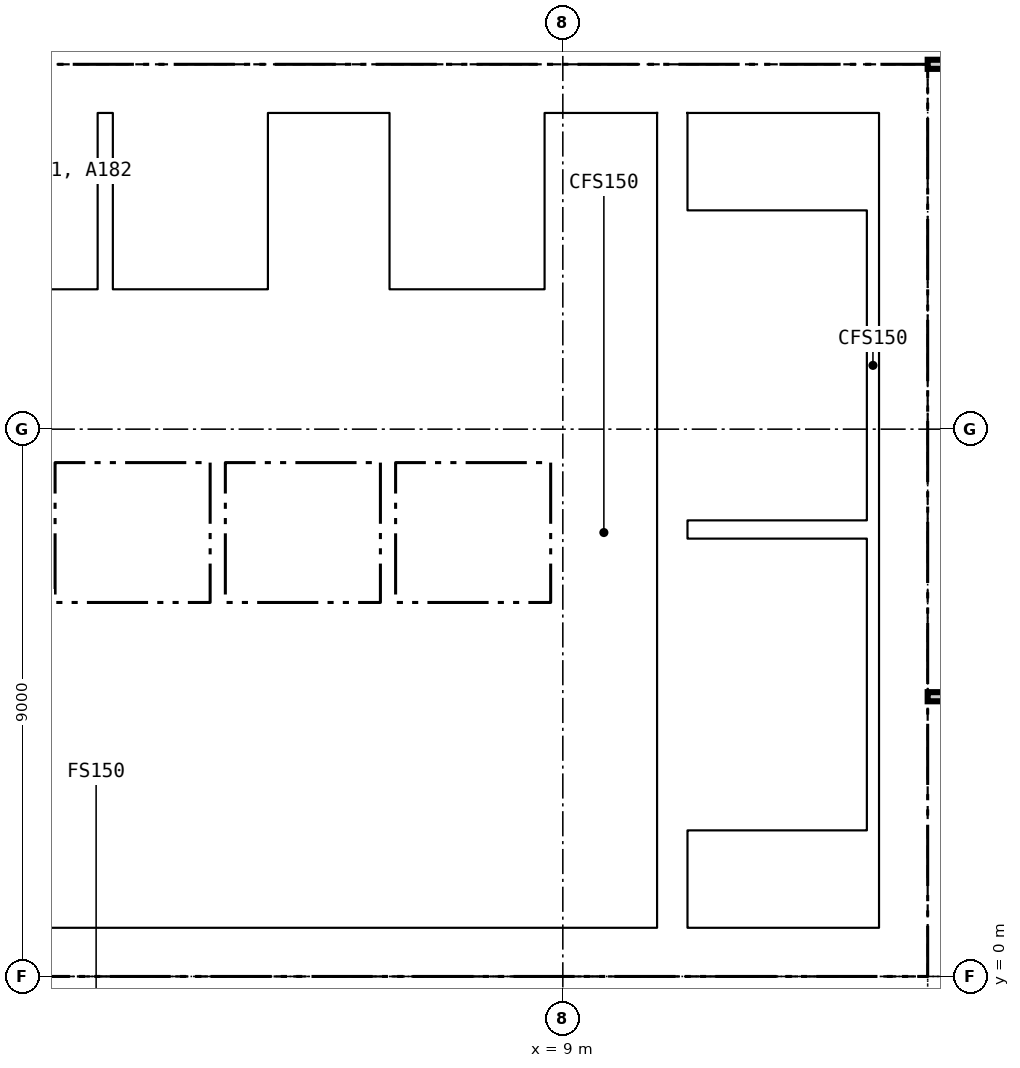
"""IFC4 building model, lengths in metres.
Left out: names, types, materials, properties, quantities, classifications, styles, units other than length and angle.
Written with IfcOpenShell. Run it as: python <this file> out.ifc"""

import sys

from ifc_helpers import new_model, si_unit, direction, frame, frame_2d, origin, place, context, subcontext, project, spatial, rectangle, extrude, element, fill, save


model = new_model("IFC4")
c1 = context("Model", 3, precision=1e-05, world=origin(), true_north=direction((0.0, 1.0)))
c2 = subcontext(c1, "Body", "Model", "MODEL_VIEW")
j1 = project(units=[si_unit("LENGTHUNIT", "METRE"), si_unit("PLANEANGLEUNIT", "RADIAN")], contexts=[c1])
p1 = place(None, origin())
s1 = spatial("IfcSite", under=j1, at=p1, CompositionType="ELEMENT")
p2 = place(p1, origin())
s2 = spatial("IfcBuilding", under=s1, at=p2, CompositionType="ELEMENT")
p3 = place(p2, frame((0.0, 0.0, 137.1)))
s3 = spatial("IfcBuildingStorey", under=s2, at=p3, CompositionType="ELEMENT", Elevation=137.1)
p4 = place(p3, frame((-15.0, 0.4, -0.15), z_axis=(0.0, 0.0, 1.0), x_axis=(1.0, 0.0, 0.0)))
e1 = element("IfcWall", 1, at=p4, inside=s3, PredefinedType="SOLIDWALL", context=c2, shape_type="SweptSolid", body=[
    extrude(rectangle(XDim=30.0, YDim=0.8, at=frame_2d((15.0, 0.0))), origin(), (0.0, 0.0, 1.0), 3.65),
])
p5 = place(p4, frame((5.8, 0.0, 0.15)))
e2 = element("IfcOpeningElement", 2, at=p5, cuts=e1, PredefinedType="OPENING", context=c2, shape_type="SweptSolid", body=[
    extrude(rectangle(XDim=2.4, YDim=2.4, at=frame_2d((1.2, 1.2))), frame((0.0, 0.41, 0.0), z_axis=(0.0, -1.0, 0.0), x_axis=(1.0, 0.0, 0.0)), (0.0, 0.0, 1.0), 0.82),
])
p6 = place(p4, frame((13.8, 0.0, 0.15)))
e3 = element("IfcOpeningElement", 3, at=p6, cuts=e1, PredefinedType="OPENING", context=c2, shape_type="SweptSolid", body=[
    extrude(rectangle(XDim=2.4, YDim=2.4, at=frame_2d((1.2, 1.2))), frame((0.0, 0.41, 0.0), z_axis=(0.0, -1.0, 0.0), x_axis=(1.0, 0.0, 0.0)), (0.0, 0.0, 1.0), 0.82),
])
p7 = place(p4, frame((21.8, 0.0, 0.15)))
e4 = element("IfcOpeningElement", 4, at=p7, cuts=e1, PredefinedType="OPENING", context=c2, shape_type="SweptSolid", body=[
    extrude(rectangle(XDim=2.4, YDim=2.4, at=frame_2d((1.2, 1.2))), frame((0.0, 0.41, 0.0), z_axis=(0.0, -1.0, 0.0), x_axis=(1.0, 0.0, 0.0)), (0.0, 0.0, 1.0), 0.82),
])
p8 = place(p4, frame((1.5, 0.0, 0.15)))
e5 = element("IfcOpeningElement", 5, at=p8, cuts=e1, PredefinedType="OPENING", context=c2, shape_type="SweptSolid", body=[
    extrude(rectangle(XDim=1.2, YDim=2.1, at=frame_2d((0.6, 1.05))), frame((0.0, 0.41, 0.0), z_axis=(0.0, -1.0, 0.0), x_axis=(1.0, 0.0, 0.0)), (0.0, 0.0, 1.0), 0.82),
])
p9 = place(p4, frame((27.3, 0.0, 0.15)))
e6 = element("IfcOpeningElement", 6, at=p9, cuts=e1, PredefinedType="OPENING", context=c2, shape_type="SweptSolid", body=[
    extrude(rectangle(XDim=1.2, YDim=2.1, at=frame_2d((0.6, 1.05))), frame((0.0, 0.41, 0.0), z_axis=(0.0, -1.0, 0.0), x_axis=(1.0, 0.0, 0.0)), (0.0, 0.0, 1.0), 0.82),
])
p10 = place(p3, frame((-15.0, 14.6, -0.15), z_axis=(0.0, 0.0, 1.0), x_axis=(1.0, 0.0, 0.0)))
e7 = element("IfcWall", 7, at=p10, inside=s3, PredefinedType="SOLIDWALL", context=c2, shape_type="SweptSolid", body=[
    extrude(rectangle(XDim=30.0, YDim=0.8, at=frame_2d((15.0, 0.0))), origin(), (0.0, 0.0, 1.0), 3.65),
])
p11 = place(p10, frame((9.25, 0.0, 0.15)))
e8 = element("IfcOpeningElement", 8, at=p11, cuts=e7, PredefinedType="OPENING", context=c2, shape_type="SweptSolid", body=[
    extrude(rectangle(XDim=1.5, YDim=2.1, at=frame_2d((0.75, 1.05))), frame((0.0, 0.41, 0.0), z_axis=(0.0, -1.0, 0.0), x_axis=(1.0, 0.0, 0.0)), (0.0, 0.0, 1.0), 0.82),
])
p12 = place(p10, frame((19.4, 0.0, 0.15)))
e9 = element("IfcOpeningElement", 9, at=p12, cuts=e7, PredefinedType="OPENING", context=c2, shape_type="SweptSolid", body=[
    extrude(rectangle(XDim=1.5, YDim=2.1, at=frame_2d((0.75, 1.05))), frame((0.0, 0.41, 0.0), z_axis=(0.0, -1.0, 0.0), x_axis=(1.0, 0.0, 0.0)), (0.0, 0.0, 1.0), 0.82),
])
p13 = place(p10, frame((1.5, 0.0, 0.15)))
e10 = element("IfcOpeningElement", 10, at=p13, cuts=e7, PredefinedType="OPENING", context=c2, shape_type="SweptSolid", body=[
    extrude(rectangle(XDim=1.2, YDim=2.1, at=frame_2d((0.6, 1.05))), frame((0.0, 0.41, 0.0), z_axis=(0.0, -1.0, 0.0), x_axis=(1.0, 0.0, 0.0)), (0.0, 0.0, 1.0), 0.82),
])
p14 = place(p10, frame((27.3, 0.0, 0.15)))
e11 = element("IfcOpeningElement", 11, at=p14, cuts=e7, PredefinedType="OPENING", context=c2, shape_type="SweptSolid", body=[
    extrude(rectangle(XDim=1.2, YDim=2.1, at=frame_2d((0.6, 1.05))), frame((0.0, 0.41, 0.0), z_axis=(0.0, -1.0, 0.0), x_axis=(1.0, 0.0, 0.0)), (0.0, 0.0, 1.0), 0.82),
])
p15 = place(p3, frame((14.6, 0.8, -0.15), z_axis=(0.0, 0.0, 1.0), x_axis=(0.0, 1.0, 0.0)))
e12 = element("IfcWall", 12, at=p15, inside=s3, PredefinedType="SOLIDWALL", context=c2, shape_type="SweptSolid", body=[
    extrude(rectangle(XDim=13.4, YDim=0.8, at=frame_2d((6.7, 0.0))), origin(), (0.0, 0.0, 1.0), 3.65),
])
p16 = place(p3, frame((10.8, 0.8, -0.15), z_axis=(0.0, 0.0, 1.0), x_axis=(0.0, 1.0, 0.0)))
e13 = element("IfcWall", 13, at=p16, inside=s3, PredefinedType="SOLIDWALL", context=c2, shape_type="SweptSolid", body=[
    extrude(rectangle(XDim=13.4, YDim=0.5, at=frame_2d((6.7, 0.0))), origin(), (0.0, 0.0, 1.0), 3.65),
])
p17 = place(p3, frame((-10.55, 3.5, 0.0), z_axis=(0.0, 0.0, 1.0), x_axis=(1.0, 0.0, 0.0)))
e14 = element("IfcWall", 14, at=p17, inside=s3, PredefinedType="PARTITIONING", context=c2, shape_type="SweptSolid", body=[
    extrude(rectangle(XDim=21.1, YDim=0.2, at=frame_2d((10.55, 0.0))), origin(), (0.0, 0.0, 1.0), 3.5),
])
p18 = place(p17, frame((0.663, 0.0, 0.0)))
e15 = element("IfcOpeningElement", 15, at=p18, cuts=e14, PredefinedType="OPENING", context=c2, shape_type="SweptSolid", body=[
    extrude(rectangle(XDim=1.0, YDim=2.1, at=frame_2d((0.5, 1.05))), frame((0.0, 0.11, 0.0), z_axis=(0.0, -1.0, 0.0), x_axis=(1.0, 0.0, 0.0)), (0.0, 0.0, 1.0), 0.22),
])
p19 = place(p17, frame((4.3, 0.0, 0.0)))
e16 = element("IfcOpeningElement", 16, at=p19, cuts=e14, PredefinedType="OPENING", context=c2, shape_type="SweptSolid", body=[
    extrude(rectangle(XDim=1.0, YDim=2.1, at=frame_2d((0.5, 1.05))), frame((0.0, 0.11, 0.0), z_axis=(0.0, -1.0, 0.0), x_axis=(1.0, 0.0, 0.0)), (0.0, 0.0, 1.0), 0.22),
])
p20 = place(p17, frame((9.1, 0.0, 0.0)))
e17 = element("IfcOpeningElement", 17, at=p20, cuts=e14, PredefinedType="OPENING", context=c2, shape_type="SweptSolid", body=[
    extrude(rectangle(XDim=1.0, YDim=2.1, at=frame_2d((0.5, 1.05))), frame((0.0, 0.11, 0.0), z_axis=(0.0, -1.0, 0.0), x_axis=(1.0, 0.0, 0.0)), (0.0, 0.0, 1.0), 0.22),
])
p21 = place(p17, frame((13.25, 0.0, 0.0)))
e18 = element("IfcOpeningElement", 18, at=p21, cuts=e14, PredefinedType="OPENING", context=c2, shape_type="SweptSolid", body=[
    extrude(rectangle(XDim=1.0, YDim=2.1, at=frame_2d((0.5, 1.05))), frame((0.0, 0.11, 0.0), z_axis=(0.0, -1.0, 0.0), x_axis=(1.0, 0.0, 0.0)), (0.0, 0.0, 1.0), 0.22),
])
p22 = place(p17, frame((16.962, 0.0, 0.0)))
e19 = element("IfcOpeningElement", 19, at=p22, cuts=e14, PredefinedType="OPENING", context=c2, shape_type="SweptSolid", body=[
    extrude(rectangle(XDim=1.0, YDim=2.1, at=frame_2d((0.5, 1.05))), frame((0.0, 0.11, 0.0), z_axis=(0.0, -1.0, 0.0), x_axis=(1.0, 0.0, 0.0)), (0.0, 0.0, 1.0), 0.22),
])
p23 = place(p17, frame((19.9, 0.0, 0.0)))
e20 = element("IfcOpeningElement", 20, at=p23, cuts=e14, PredefinedType="OPENING", context=c2, shape_type="SweptSolid", body=[
    extrude(rectangle(XDim=0.9, YDim=2.1, at=frame_2d((0.45, 1.05))), frame((0.0, 0.11, 0.0), z_axis=(0.0, -1.0, 0.0), x_axis=(1.0, 0.0, 0.0)), (0.0, 0.0, 1.0), 0.22),
])
p24 = place(p3, frame((-10.55, 6.025, 0.0), z_axis=(0.0, 0.0, 1.0), x_axis=(1.0, 0.0, 0.0)))
e21 = element("IfcWall", 21, at=p24, inside=s3, PredefinedType="PARTITIONING", context=c2, shape_type="SweptSolid", body=[
    extrude(rectangle(XDim=21.1, YDim=0.25, at=frame_2d((10.55, 0.0))), origin(), (0.0, 0.0, 1.0), 3.5),
])
p25 = place(p3, frame((-10.55, 8.55, 0.0), z_axis=(0.0, 0.0, 1.0), x_axis=(1.0, 0.0, 0.0)))
e22 = element("IfcWall", 22, at=p25, inside=s3, PredefinedType="PARTITIONING", context=c2, shape_type="SweptSolid", body=[
    extrude(rectangle(XDim=21.1, YDim=0.2, at=frame_2d((10.55, 0.0))), origin(), (0.0, 0.0, 1.0), 3.5),
])
p26 = place(p25, frame((0.675, 0.0, 0.0)))
e23 = element("IfcOpeningElement", 23, at=p26, cuts=e22, PredefinedType="OPENING", context=c2, shape_type="SweptSolid", body=[
    extrude(rectangle(XDim=1.2, YDim=2.1, at=frame_2d((0.6, 1.05))), frame((0.0, 0.11, 0.0), z_axis=(0.0, -1.0, 0.0), x_axis=(1.0, 0.0, 0.0)), (0.0, 0.0, 1.0), 0.22),
])
p27 = place(p25, frame((3.475, 0.0, 0.0)))
e24 = element("IfcOpeningElement", 24, at=p27, cuts=e22, PredefinedType="OPENING", context=c2, shape_type="SweptSolid", body=[
    extrude(rectangle(XDim=1.2, YDim=2.1, at=frame_2d((0.6, 1.05))), frame((0.0, 0.11, 0.0), z_axis=(0.0, -1.0, 0.0), x_axis=(1.0, 0.0, 0.0)), (0.0, 0.0, 1.0), 0.22),
])
p28 = place(p25, frame((6.275, 0.0, 0.0)))
e25 = element("IfcOpeningElement", 25, at=p28, cuts=e22, PredefinedType="OPENING", context=c2, shape_type="SweptSolid", body=[
    extrude(rectangle(XDim=1.2, YDim=2.1, at=frame_2d((0.6, 1.05))), frame((0.0, 0.11, 0.0), z_axis=(0.0, -1.0, 0.0), x_axis=(1.0, 0.0, 0.0)), (0.0, 0.0, 1.0), 0.22),
])
p29 = place(p25, frame((9.075, 0.0, 0.0)))
e26 = element("IfcOpeningElement", 26, at=p29, cuts=e22, PredefinedType="OPENING", context=c2, shape_type="SweptSolid", body=[
    extrude(rectangle(XDim=1.2, YDim=2.1, at=frame_2d((0.6, 1.05))), frame((0.0, 0.11, 0.0), z_axis=(0.0, -1.0, 0.0), x_axis=(1.0, 0.0, 0.0)), (0.0, 0.0, 1.0), 0.22),
])
p30 = place(p25, frame((11.875, 0.0, 0.0)))
e27 = element("IfcOpeningElement", 27, at=p30, cuts=e22, PredefinedType="OPENING", context=c2, shape_type="SweptSolid", body=[
    extrude(rectangle(XDim=1.2, YDim=2.1, at=frame_2d((0.6, 1.05))), frame((0.0, 0.11, 0.0), z_axis=(0.0, -1.0, 0.0), x_axis=(1.0, 0.0, 0.0)), (0.0, 0.0, 1.0), 0.22),
])
p31 = place(p25, frame((14.675, 0.0, 0.0)))
e28 = element("IfcOpeningElement", 28, at=p31, cuts=e22, PredefinedType="OPENING", context=c2, shape_type="SweptSolid", body=[
    extrude(rectangle(XDim=1.2, YDim=2.1, at=frame_2d((0.6, 1.05))), frame((0.0, 0.11, 0.0), z_axis=(0.0, -1.0, 0.0), x_axis=(1.0, 0.0, 0.0)), (0.0, 0.0, 1.0), 0.22),
])
p32 = place(p25, frame((17.475, 0.0, 0.0)))
e29 = element("IfcOpeningElement", 29, at=p32, cuts=e22, PredefinedType="OPENING", context=c2, shape_type="SweptSolid", body=[
    extrude(rectangle(XDim=1.2, YDim=2.1, at=frame_2d((0.6, 1.05))), frame((0.0, 0.11, 0.0), z_axis=(0.0, -1.0, 0.0), x_axis=(1.0, 0.0, 0.0)), (0.0, 0.0, 1.0), 0.22),
])
p33 = place(p25, frame((19.9, 0.0, 0.0)))
e30 = element("IfcOpeningElement", 30, at=p33, cuts=e22, PredefinedType="OPENING", context=c2, shape_type="SweptSolid", body=[
    extrude(rectangle(XDim=0.9, YDim=2.1, at=frame_2d((0.45, 1.05))), frame((0.0, 0.11, 0.0), z_axis=(0.0, -1.0, 0.0), x_axis=(1.0, 0.0, 0.0)), (0.0, 0.0, 1.0), 0.22),
])
p34 = place(p3, frame((-4.25, 11.2, 0.0), z_axis=(0.0, 0.0, 1.0), x_axis=(1.0, 0.0, 0.0)))
e31 = element("IfcWall", 31, at=p34, inside=s3, PredefinedType="PARTITIONING", context=c2, shape_type="SweptSolid", body=[
    extrude(rectangle(XDim=8.65, YDim=0.2, at=frame_2d((4.325, 0.0))), origin(), (0.0, 0.0, 1.0), 3.5),
])
p35 = place(p34, frame((0.825, 0.0, 0.0)))
e32 = element("IfcOpeningElement", 32, at=p35, cuts=e31, PredefinedType="OPENING", context=c2, shape_type="SweptSolid", body=[
    extrude(rectangle(XDim=1.4, YDim=2.1, at=frame_2d((0.7, 1.05))), frame((0.0, 0.11, 0.0), z_axis=(0.0, -1.0, 0.0), x_axis=(1.0, 0.0, 0.0)), (0.0, 0.0, 1.0), 0.22),
])
p36 = place(p34, frame((3.625, 0.0, 0.0)))
e33 = element("IfcOpeningElement", 33, at=p36, cuts=e31, PredefinedType="OPENING", context=c2, shape_type="SweptSolid", body=[
    extrude(rectangle(XDim=1.4, YDim=2.1, at=frame_2d((0.7, 1.05))), frame((0.0, 0.11, 0.0), z_axis=(0.0, -1.0, 0.0), x_axis=(1.0, 0.0, 0.0)), (0.0, 0.0, 1.0), 0.22),
])
p37 = place(p3, frame((5.9, 11.2, 0.0), z_axis=(0.0, 0.0, 1.0), x_axis=(1.0, 0.0, 0.0)))
e34 = element("IfcWall", 34, at=p37, inside=s3, PredefinedType="PARTITIONING", context=c2, shape_type="SweptSolid", body=[
    extrude(rectangle(XDim=4.65, YDim=0.2, at=frame_2d((2.325, 0.0))), origin(), (0.0, 0.0, 1.0), 3.5),
])
p38 = place(p37, frame((3.4, 0.0, 0.0)))
e35 = element("IfcOpeningElement", 35, at=p38, cuts=e34, PredefinedType="OPENING", context=c2, shape_type="SweptSolid", body=[
    extrude(rectangle(XDim=0.9, YDim=2.1, at=frame_2d((0.45, 1.05))), frame((0.0, 0.11, 0.0), z_axis=(0.0, -1.0, 0.0), x_axis=(1.0, 0.0, 0.0)), (0.0, 0.0, 1.0), 0.22),
])
for number, where, z_axis, x_axis in (
    (36, (1.45, 3.6, 0.0), (0.0, 0.0, 1.0), (0.0, 1.0, 0.0)),
    (37, (4.95, 3.6, 0.0), (0.0, 0.0, 1.0), (0.0, 1.0, 0.0)),
):
    element("IfcWall", number, at=place(p3, frame(where, z_axis=z_axis, x_axis=x_axis)), inside=s3, PredefinedType="PARTITIONING", context=c2, shape_type="SweptSolid", body=[
        extrude(rectangle(XDim=2.3, YDim=0.15, at=frame_2d((1.15, 0.0))), origin(), (0.0, 0.0, 1.0), 3.5),
    ])
p39 = place(p3, frame((8.925, 3.6, 0.0), z_axis=(0.0, 0.0, 1.0), x_axis=(0.0, 1.0, 0.0)))
e38 = element("IfcWall", 38, at=p39, inside=s3, PredefinedType="PARTITIONING", context=c2, shape_type="SweptSolid", body=[
    extrude(rectangle(XDim=2.3, YDim=0.25, at=frame_2d((1.15, 0.0))), origin(), (0.0, 0.0, 1.0), 3.5),
])
for number, where, z_axis, x_axis in (
    (39, (0.525, 6.15, 0.0), (0.0, 0.0, 1.0), (0.0, 1.0, 0.0)),
    (40, (3.325, 6.15, 0.0), (0.0, 0.0, 1.0), (0.0, 1.0, 0.0)),
    (41, (6.125, 6.15, 0.0), (0.0, 0.0, 1.0), (0.0, 1.0, 0.0)),
    (42, (8.925, 6.15, 0.0), (0.0, 0.0, 1.0), (0.0, 1.0, 0.0)),
):
    element("IfcWall", number, at=place(p3, frame(where, z_axis=z_axis, x_axis=x_axis)), inside=s3, PredefinedType="PARTITIONING", context=c2, shape_type="SweptSolid", body=[
        extrude(rectangle(XDim=2.3, YDim=0.25, at=frame_2d((1.15, 0.0))), origin(), (0.0, 0.0, 1.0), 3.5),
    ])
for number, where, z_axis, x_axis in (
    (43, (1.475, 11.3, 0.0), (0.0, 0.0, 1.0), (0.0, 1.0, 0.0)),
    (44, (4.275, 11.3, 0.0), (0.0, 0.0, 1.0), (0.0, 1.0, 0.0)),
    (45, (6.025, 11.3, 0.0), (0.0, 0.0, 1.0), (0.0, 1.0, 0.0)),
    (46, (8.825, 11.3, 0.0), (0.0, 0.0, 1.0), (0.0, 1.0, 0.0)),
):
    element("IfcWall", number, at=place(p3, frame(where, z_axis=z_axis, x_axis=x_axis)), inside=s3, PredefinedType="PARTITIONING", context=c2, shape_type="SweptSolid", body=[
        extrude(rectangle(XDim=2.9, YDim=0.25, at=frame_2d((1.45, 0.0))), origin(), (0.0, 0.0, 1.0), 3.5),
    ])
p40 = place(p3, frame((11.05, 7.35, 0.0), z_axis=(0.0, 0.0, 1.0), x_axis=(1.0, 0.0, 0.0)))
e47 = element("IfcWall", 47, at=p40, inside=s3, PredefinedType="SOLIDWALL", context=c2, shape_type="SweptSolid", body=[
    extrude(rectangle(XDim=2.95, YDim=0.3, at=frame_2d((1.475, 0.0))), origin(), (0.0, 0.0, 1.0), 3.5),
])
p41 = place(p3, frame((14.1, 0.8, 0.0), z_axis=(0.0, 0.0, 1.0), x_axis=(0.0, 1.0, 0.0)))
e48 = element("IfcWall", 48, at=p41, inside=s3, PredefinedType="SOLIDWALL", context=c2, shape_type="SweptSolid", body=[
    extrude(rectangle(XDim=13.4, YDim=0.2, at=frame_2d((6.7, 0.0))), origin(), (0.0, 0.0, 1.0), 3.5),
])
p42 = place(p3, frame((16.297, 15.0, 0.0), z_axis=(0.0, 0.0, 1.0), x_axis=(-1.0, 0.0, 0.0)))
e49 = element("IfcWall", 49, at=p42, inside=s3, PredefinedType="PARTITIONING", context=c2, shape_type="SweptSolid", body=[
    extrude(rectangle(XDim=1.297, YDim=0.15, at=frame_2d((0.648, 0.0))), origin(), (0.0, 0.0, 1.0), 2.741),
])
p43 = place(p3, frame((15.0, 4.6, 0.0), z_axis=(0.0, 0.0, 1.0), x_axis=(1.0, 0.0, 0.0)))
e50 = element("IfcWall", 50, at=p43, inside=s3, PredefinedType="PARTITIONING", context=c2, shape_type="SweptSolid", body=[
    extrude(rectangle(XDim=3.533, YDim=0.15, at=frame_2d((1.767, 0.0))), origin(), (0.0, 0.0, 1.0), 2.741),
])
p44 = place(p21, origin())
e51 = element("IfcDoor", 51, at=p44, inside=s3, OperationType="SINGLE_SWING_RIGHT", PredefinedType="DOOR", context=c2, shape_type="SweptSolid", body=[
    extrude(rectangle(XDim=1.0, YDim=2.1, at=frame_2d((0.5, 1.05))), frame((0.0, 0.025, 0.0), z_axis=(0.0, -1.0, 0.0), x_axis=(1.0, 0.0, 0.0)), (0.0, 0.0, 1.0), 0.05),
])
fill(e18, e51)
p45 = place(p22, origin())
e52 = element("IfcDoor", 52, at=p45, inside=s3, OperationType="SINGLE_SWING_LEFT", PredefinedType="DOOR", context=c2, shape_type="SweptSolid", body=[
    extrude(rectangle(XDim=1.0, YDim=2.1, at=frame_2d((0.5, 1.05))), frame((0.0, 0.025, 0.0), z_axis=(0.0, -1.0, 0.0), x_axis=(1.0, 0.0, 0.0)), (0.0, 0.0, 1.0), 0.05),
])
fill(e19, e52)
p46 = place(p23, origin())
e53 = element("IfcDoor", 53, at=p46, inside=s3, OperationType="SINGLE_SWING_RIGHT", PredefinedType="DOOR", context=c2, shape_type="SweptSolid", body=[
    extrude(rectangle(XDim=0.9, YDim=2.1, at=frame_2d((0.45, 1.05))), frame((0.0, 0.025, 0.0), z_axis=(0.0, -1.0, 0.0), x_axis=(1.0, 0.0, 0.0)), (0.0, 0.0, 1.0), 0.05),
])
fill(e20, e53)
p47 = place(p30, origin())
e54 = element("IfcDoor", 54, at=p47, inside=s3, OperationType="DOUBLE_DOOR_SLIDING", PredefinedType="DOOR", context=c2, shape_type="SweptSolid", body=[
    extrude(rectangle(XDim=1.2, YDim=2.1, at=frame_2d((0.6, 1.05))), frame((0.0, 0.025, 0.0), z_axis=(0.0, -1.0, 0.0), x_axis=(1.0, 0.0, 0.0)), (0.0, 0.0, 1.0), 0.05),
])
fill(e27, e54)
p48 = place(p31, origin())
e55 = element("IfcDoor", 55, at=p48, inside=s3, OperationType="DOUBLE_DOOR_SLIDING", PredefinedType="DOOR", context=c2, shape_type="SweptSolid", body=[
    extrude(rectangle(XDim=1.2, YDim=2.1, at=frame_2d((0.6, 1.05))), frame((0.0, 0.025, 0.0), z_axis=(0.0, -1.0, 0.0), x_axis=(1.0, 0.0, 0.0)), (0.0, 0.0, 1.0), 0.05),
])
fill(e28, e55)
p49 = place(p32, origin())
e56 = element("IfcDoor", 56, at=p49, inside=s3, OperationType="DOUBLE_DOOR_SLIDING", PredefinedType="DOOR", context=c2, shape_type="SweptSolid", body=[
    extrude(rectangle(XDim=1.2, YDim=2.1, at=frame_2d((0.6, 1.05))), frame((0.0, 0.025, 0.0), z_axis=(0.0, -1.0, 0.0), x_axis=(1.0, 0.0, 0.0)), (0.0, 0.0, 1.0), 0.05),
])
fill(e29, e56)
p50 = place(p33, origin())
e57 = element("IfcDoor", 57, at=p50, inside=s3, OperationType="SINGLE_SWING_RIGHT", PredefinedType="DOOR", context=c2, shape_type="SweptSolid", body=[
    extrude(rectangle(XDim=0.9, YDim=2.1, at=frame_2d((0.45, 1.05))), frame((0.0, 0.025, 0.0), z_axis=(0.0, -1.0, 0.0), x_axis=(1.0, 0.0, 0.0)), (0.0, 0.0, 1.0), 0.05),
])
fill(e30, e57)
p51 = place(p36, origin())
e58 = element("IfcDoor", 58, at=p51, inside=s3, OperationType="DOUBLE_DOOR_SLIDING", PredefinedType="DOOR", context=c2, shape_type="SweptSolid", body=[
    extrude(rectangle(XDim=1.4, YDim=2.1, at=frame_2d((0.7, 1.05))), frame((0.0, 0.025, 0.0), z_axis=(0.0, -1.0, 0.0), x_axis=(1.0, 0.0, 0.0)), (0.0, 0.0, 1.0), 0.05),
])
fill(e33, e58)
p52 = place(p38, origin())
e59 = element("IfcDoor", 59, at=p52, inside=s3, OperationType="SINGLE_SWING_LEFT", PredefinedType="DOOR", context=c2, shape_type="SweptSolid", body=[
    extrude(rectangle(XDim=0.9, YDim=2.1, at=frame_2d((0.45, 1.05))), frame((0.0, 0.025, 0.0), z_axis=(0.0, -1.0, 0.0), x_axis=(1.0, 0.0, 0.0)), (0.0, 0.0, 1.0), 0.05),
])
fill(e35, e59)
p53 = place(p6, origin())
e60 = element("IfcDoor", 60, at=p53, inside=s3, OperationType="DOUBLE_DOOR_DOUBLE_SWING", PredefinedType="DOOR", context=c2, shape_type="SweptSolid", body=[
    extrude(rectangle(XDim=2.4, YDim=2.4, at=frame_2d((1.2, 1.2))), frame((0.0, 0.025, 0.0), z_axis=(0.0, -1.0, 0.0), x_axis=(1.0, 0.0, 0.0)), (0.0, 0.0, 1.0), 0.05),
])
fill(e3, e60)
p54 = place(p7, origin())
e61 = element("IfcDoor", 61, at=p54, inside=s3, OperationType="DOUBLE_DOOR_DOUBLE_SWING", PredefinedType="DOOR", context=c2, shape_type="SweptSolid", body=[
    extrude(rectangle(XDim=2.4, YDim=2.4, at=frame_2d((1.2, 1.2))), frame((0.0, 0.025, 0.0), z_axis=(0.0, -1.0, 0.0), x_axis=(1.0, 0.0, 0.0)), (0.0, 0.0, 1.0), 0.05),
])
fill(e4, e61)
p55 = place(p12, origin())
e62 = element("IfcDoor", 62, at=p55, inside=s3, OperationType="DOUBLE_DOOR_SINGLE_SWING", PredefinedType="DOOR", context=c2, shape_type="SweptSolid", body=[
    extrude(rectangle(XDim=1.5, YDim=2.1, at=frame_2d((0.75, 1.05))), frame((0.0, 0.025, 0.0), z_axis=(0.0, -1.0, 0.0), x_axis=(1.0, 0.0, 0.0)), (0.0, 0.0, 1.0), 0.05),
])
fill(e9, e62)
p56 = place(p14, origin())
e63 = element("IfcDoor", 63, at=p56, inside=s3, OperationType="SINGLE_SWING_LEFT", PredefinedType="DOOR", context=c2, shape_type="SweptSolid", body=[
    extrude(rectangle(XDim=1.2, YDim=2.1, at=frame_2d((0.6, 1.05))), frame((0.0, 0.025, 0.0), z_axis=(0.0, -1.0, 0.0), x_axis=(1.0, 0.0, 0.0)), (0.0, 0.0, 1.0), 0.05),
])
fill(e11, e63)
p57 = place(p9, origin())
e64 = element("IfcDoor", 64, at=p57, inside=s3, OperationType="SINGLE_SWING_RIGHT", PredefinedType="DOOR", context=c2, shape_type="SweptSolid", body=[
    extrude(rectangle(XDim=1.2, YDim=2.1, at=frame_2d((0.6, 1.05))), frame((0.0, 0.025, 0.0), z_axis=(0.0, -1.0, 0.0), x_axis=(1.0, 0.0, 0.0)), (0.0, 0.0, 1.0), 0.05),
])
fill(e6, e64)
save(model, sys.argv[1])
